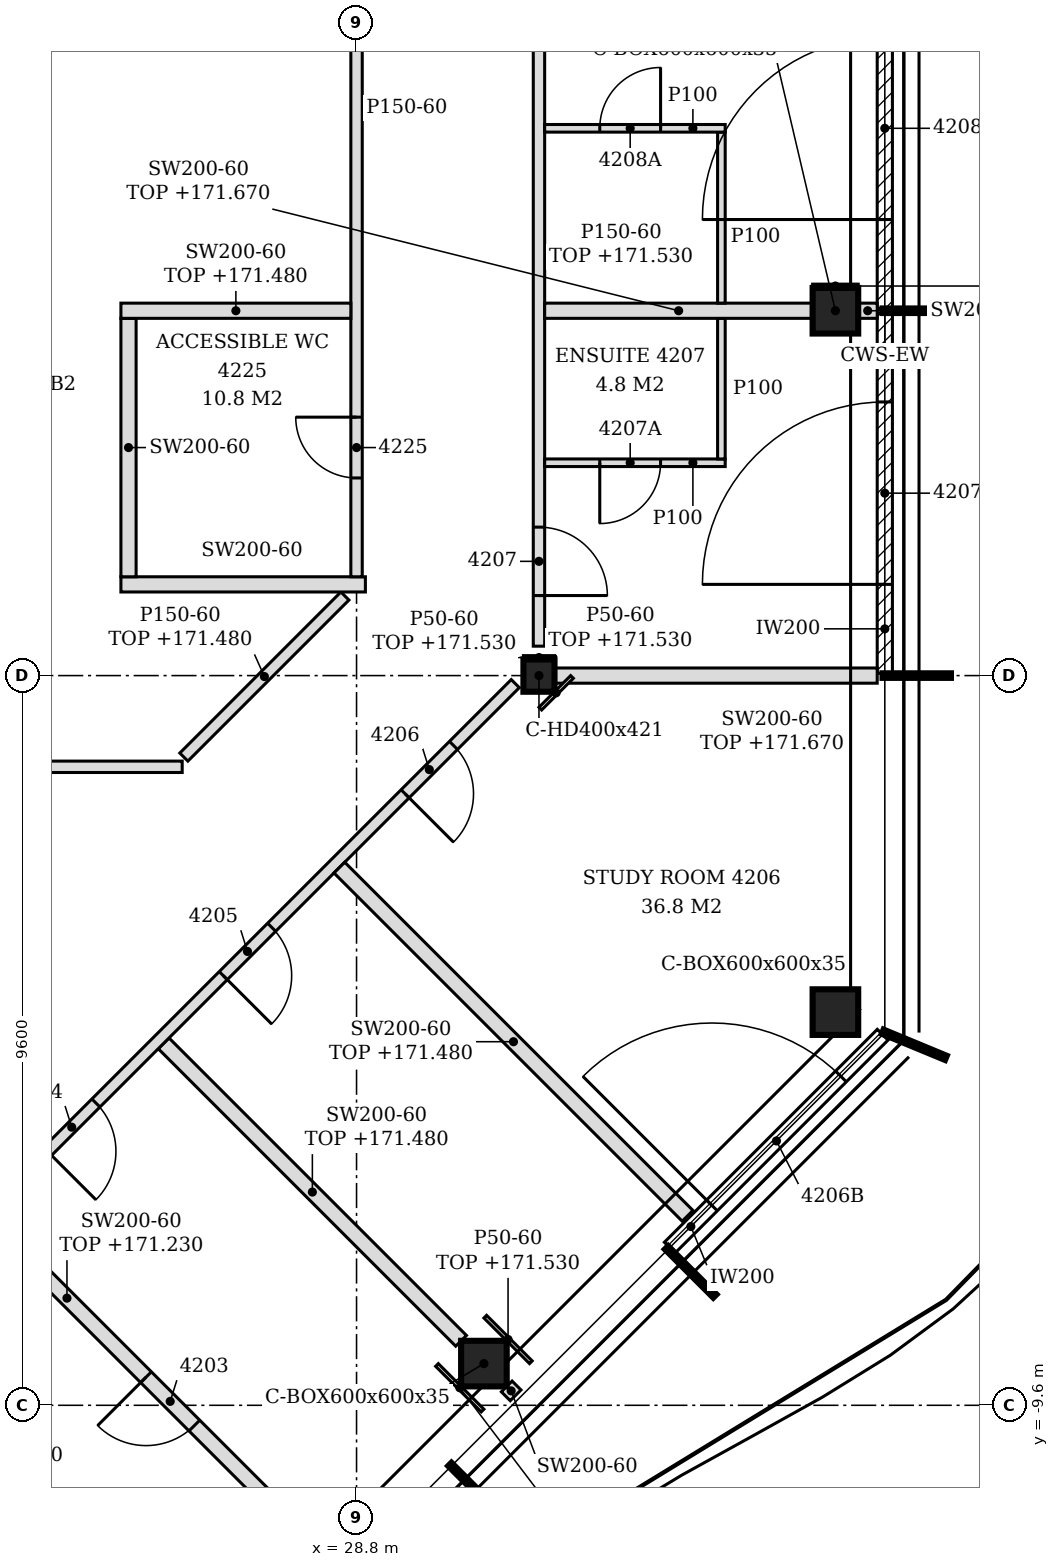
"""IFC4 building model, lengths in metres.
Left out: names, types, materials, properties, quantities, classifications, styles, units other than length and angle.
Written with IfcOpenShell. Run it as: python <this file> out.ifc"""

import sys

from ifc_helpers import new_model, si_unit, direction, frame, frame_2d, origin, origin_2d, place, context, subcontext, project, spatial, polyline, rectangle, hollow_rectangle, i_section, outline, extrude, clip, halfspace, element, fill, save


model = new_model("IFC4")
c1 = context("Model", 3, precision=1e-05, world=origin(), true_north=direction((0.0, 1.0)))
c2 = subcontext(c1, "Body", "Model", "MODEL_VIEW")
j1 = project(units=[si_unit("LENGTHUNIT", "METRE"), si_unit("PLANEANGLEUNIT", "RADIAN")], contexts=[c1])
p1 = place(None, origin())
s1 = spatial("IfcSite", under=j1, at=p1, CompositionType="ELEMENT")
p2 = place(p1, origin())
s2 = spatial("IfcBuilding", under=s1, at=p2, CompositionType="ELEMENT")
p3 = place(p2, frame((0.0, 0.0, 168.6)))
s3 = spatial("IfcBuildingStorey", under=s2, at=p3, CompositionType="ELEMENT", Elevation=168.6)
for number, where, z_axis, x_axis in (
    (1, (30.476, -9.052, -0.15), (0.0, 0.0, 1.0), (1.0, 0.0, 0.0)),
    (2, (35.1, -4.427, -0.15), (0.0, 0.0, 1.0), (1.0, 0.0, 0.0)),
    (3, (35.1, 4.8, -0.15), (0.0, 0.0, 1.0), (1.0, 0.0, 0.0)),
):
    element("IfcColumn", number, at=place(p3, frame(where, z_axis=z_axis, x_axis=x_axis)), inside=s3, PredefinedType="COLUMN", context=c2, shape_type="Clipping", body=[
        clip(extrude(hollow_rectangle(XDim=0.6, YDim=0.6, WallThickness=0.035, at=origin_2d()), origin(), (0.0, 0.0, 1.0), 3.6), halfspace(frame((0.0, 0.0, 3.589), z_axis=(0.0, 0.0, 1.0), x_axis=(1.0, 0.0, 0.0)), False)),
    ])
p4 = place(p3, frame((31.2, 0.0, -0.15), z_axis=(0.0, 0.0, 1.0), x_axis=(1.0, 0.0, 0.0)))
e4 = element("IfcColumn", 4, at=p4, inside=s3, PredefinedType="COLUMN", context=c2, shape_type="SweptSolid", body=[
    extrude(i_section(OverallWidth=0.409, OverallDepth=0.425, WebThickness=0.033, FlangeThickness=0.052, FilletRadius=0.015, at=origin_2d()), origin(), (0.0, 0.0, 1.0), 3.6),
])
p5 = place(p3, frame((32.92, -7.526, 0.0), z_axis=(0.0, 0.0, 1.0), x_axis=(0.707106781187, 0.707106781187, 0.0)))
e5 = element("IfcWall", 5, at=p5, inside=s3, PredefinedType="NOTDEFINED", context=c2, shape_type="SweptSolid", body=[
    extrude(rectangle(XDim=3.962, YDim=0.2, at=frame_2d((1.981, 0.0))), origin(), (0.0, 0.0, 1.0), 3.45),
])
p6 = place(p5, frame((0.785, 0.0, 0.0)))
e6 = element("IfcOpeningElement", 6, at=p6, cuts=e5, PredefinedType="OPENING", context=c2, shape_type="SweptSolid", body=[
    extrude(rectangle(XDim=2.4, YDim=2.4, at=frame_2d((1.2, 1.2))), frame((0.0, 0.11, 0.0), z_axis=(0.0, -1.0, 0.0), x_axis=(1.0, 0.0, 0.0)), (0.0, 0.0, 1.0), 0.22),
])
p7 = place(p3, frame((35.75, 0.03, 0.0), z_axis=(0.0, 0.0, 1.0), x_axis=(0.0, 1.0, 0.0)))
e7 = element("IfcWall", 7, at=p7, inside=s3, PredefinedType="NOTDEFINED", context=c2, shape_type="SweptSolid", body=[
    extrude(rectangle(XDim=4.74, YDim=0.2, at=frame_2d((2.37, 0.0))), origin(), (0.0, 0.0, 1.0), 3.45),
])
p8 = place(p7, frame((1.17, 0.0, 0.0)))
e8 = element("IfcOpeningElement", 8, at=p8, cuts=e7, PredefinedType="OPENING", context=c2, shape_type="SweptSolid", body=[
    extrude(rectangle(XDim=2.4, YDim=2.4, at=frame_2d((1.2, 1.2))), frame((0.0, 0.11, 0.0), z_axis=(0.0, -1.0, 0.0), x_axis=(1.0, 0.0, 0.0)), (0.0, 0.0, 1.0), 0.22),
])
p9 = place(p3, frame((35.75, 4.83, 0.0), z_axis=(0.0, 0.0, 1.0), x_axis=(0.0, 1.0, 0.0)))
e9 = element("IfcWall", 9, at=p9, inside=s3, PredefinedType="NOTDEFINED", context=c2, shape_type="SweptSolid", body=[
    extrude(rectangle(XDim=4.74, YDim=0.2, at=frame_2d((2.37, 0.0))), origin(), (0.0, 0.0, 1.0), 3.45),
])
p10 = place(p9, frame((1.17, 0.0, 0.0)))
e10 = element("IfcOpeningElement", 10, at=p10, cuts=e9, PredefinedType="OPENING", context=c2, shape_type="SweptSolid", body=[
    extrude(rectangle(XDim=2.4, YDim=2.4, at=frame_2d((1.2, 1.2))), frame((0.0, 0.11, 0.0), z_axis=(0.0, -1.0, 0.0), x_axis=(1.0, 0.0, 0.0)), (0.0, 0.0, 1.0), 0.22),
])
p11 = place(p3, frame((25.552, -13.375, 0.0), z_axis=(0.0, 0.0, 1.0), x_axis=(-0.707106781187, 0.707106781187, 0.0)))
e11 = element("IfcWall", 11, at=p11, inside=s3, PredefinedType="PARTITIONING", context=c2, shape_type="SweptSolid", body=[
    extrude(rectangle(XDim=6.83, YDim=0.2, at=frame_2d((3.415, 0.0))), origin(), (0.0, 0.0, 1.0), 2.93),
])
p12 = place(p3, frame((28.581, -11.781, 0.0), z_axis=(0.0, 0.0, 1.0), x_axis=(-0.707106781187, 0.707106781187, 0.0)))
e12 = element("IfcWall", 12, at=p12, inside=s3, PredefinedType="PARTITIONING", context=c2, shape_type="SweptSolid", body=[
    extrude(rectangle(XDim=6.549, YDim=0.2, at=frame_2d((3.274, 0.0))), origin(), (0.0, 0.0, 1.0), 2.63),
])
p13 = place(p12, frame((2.707, 0.0, 0.0)))
e13 = element("IfcOpeningElement", 13, at=p13, cuts=e12, PredefinedType="OPENING", context=c2, shape_type="SweptSolid", body=[
    extrude(rectangle(XDim=0.9, YDim=2.1, at=frame_2d((0.45, 1.05))), frame((0.0, 0.11, 0.0), z_axis=(0.0, -1.0, 0.0), x_axis=(1.0, 0.0, 0.0)), (0.0, 0.0, 1.0), 0.22),
])
p14 = place(p3, frame((30.893, -9.469, 0.0), z_axis=(0.0, 0.0, 1.0), x_axis=(-0.707106781187, 0.707106781187, 0.0)))
e14 = element("IfcWall", 14, at=p14, inside=s3, PredefinedType="PARTITIONING", context=c2, shape_type="SweptSolid", body=[
    extrude(rectangle(XDim=0.166, YDim=0.2, at=frame_2d((0.083, 0.0))), origin(), (0.0, 0.0, 1.0), 3.45),
])
p15 = place(p3, frame((30.176, -8.752, 0.0), z_axis=(0.0, 0.0, 1.0), x_axis=(-0.707084725798, 0.707128835887, 0.0)))
e15 = element("IfcWall", 15, at=p15, inside=s3, PredefinedType="PARTITIONING", context=c2, shape_type="SweptSolid", body=[
    extrude(rectangle(XDim=5.535, YDim=0.2, at=frame_2d((2.768, 0.0))), origin(), (0.0, 0.0, 1.0), 2.88),
])
p16 = place(p3, frame((22.722, -8.272, 0.0), z_axis=(0.0, 0.0, 1.0), x_axis=(0.707106781187, 0.707106781187, 0.0)))
e16 = element("IfcWall", 16, at=p16, inside=s3, PredefinedType="PARTITIONING", context=c2, shape_type="SweptSolid", body=[
    extrude(rectangle(XDim=11.549, YDim=0.15, at=frame_2d((5.774, 0.0))), origin(), (0.0, 0.0, 1.0), 2.88),
])
p17 = place(p16, frame((2.846, 0.0, 0.0)))
e17 = element("IfcOpeningElement", 17, at=p17, cuts=e16, PredefinedType="OPENING", context=c2, shape_type="SweptSolid", body=[
    extrude(rectangle(XDim=0.9, YDim=2.1, at=frame_2d((0.45, 1.05))), frame((0.0, 0.085, 0.0), z_axis=(0.0, -1.0, 0.0), x_axis=(1.0, 0.0, 0.0)), (0.0, 0.0, 1.0), 0.17),
])
p18 = place(p16, frame((6.116, 0.0, 0.0)))
e18 = element("IfcOpeningElement", 18, at=p18, cuts=e16, PredefinedType="OPENING", context=c2, shape_type="SweptSolid", body=[
    extrude(rectangle(XDim=0.9, YDim=2.1, at=frame_2d((0.45, 1.05))), frame((0.0, 0.085, 0.0), z_axis=(0.0, -1.0, 0.0), x_axis=(1.0, 0.0, 0.0)), (0.0, 0.0, 1.0), 0.17),
])
p19 = place(p16, frame((9.499, 0.0, 0.0)))
e19 = element("IfcOpeningElement", 19, at=p19, cuts=e16, PredefinedType="OPENING", context=c2, shape_type="SweptSolid", body=[
    extrude(rectangle(XDim=0.9, YDim=2.1, at=frame_2d((0.45, 1.05))), frame((0.0, 0.085, 0.0), z_axis=(0.0, -1.0, 0.0), x_axis=(1.0, 0.0, 0.0)), (0.0, 0.0, 1.0), 0.17),
])
p20 = place(p3, frame((33.155, -7.107, 0.0), z_axis=(0.0, 0.0, 1.0), x_axis=(-0.70708794033, 0.707125621541, 0.0)))
e20 = element("IfcWall", 20, at=p20, inside=s3, PredefinedType="PARTITIONING", context=c2, shape_type="SweptSolid", body=[
    extrude(rectangle(XDim=6.479, YDim=0.2, at=frame_2d((3.24, 0.0))), origin(), (0.0, 0.0, 1.0), 2.88),
])
p21 = place(p3, frame((19.125, -1.2, 0.0), z_axis=(0.0, 0.0, 1.0), x_axis=(1.0, 0.0, 0.0)))
e21 = element("IfcWall", 21, at=p21, inside=s3, PredefinedType="PARTITIONING", context=c2, shape_type="SweptSolid", body=[
    extrude(outline(polyline([(0.0, 0.0), (7.381, 0.0), (7.381, 3.45), (0.225, 3.45), (0.223, 2.83), (0.0, 2.83), (0.0, 0.0)])), frame((0.0, 0.075, 0.0), z_axis=(0.0, -1.0, 0.0), x_axis=(1.0, 0.0, 0.0)), (0.0, 0.0, 1.0), 0.15),
])
p22 = place(p3, frame((26.528, -1.072, 0.0), z_axis=(0.0, 0.0, 1.0), x_axis=(0.707106781187, 0.707106781187, 0.0)))
e22 = element("IfcWall", 22, at=p22, inside=s3, PredefinedType="PARTITIONING", context=c2, shape_type="SweptSolid", body=[
    extrude(rectangle(XDim=2.997, YDim=0.15, at=frame_2d((1.498, 0.0))), origin(), (0.0, 0.0, 1.0), 2.88),
])
p23 = place(p3, frame((31.405, 0.0, 0.0), z_axis=(0.0, 0.0, 1.0), x_axis=(1.0, 0.0, 0.0)))
e23 = element("IfcWall", 23, at=p23, inside=s3, PredefinedType="PARTITIONING", context=c2, shape_type="SweptSolid", body=[
    extrude(outline(polyline([(0.0, 0.0), (4.245, 0.0), (4.246, 3.07), (3.845, 3.07), (3.844, 2.93), (3.545, 2.93), (3.543, 3.07), (0.0, 3.07), (0.0, 0.0)])), frame((0.0, 0.1, 0.0), z_axis=(0.0, -1.0, 0.0), x_axis=(1.0, 0.0, 0.0)), (0.0, 0.0, 1.0), 0.2),
])
p24 = place(p3, frame((31.2, 0.387, 0.0), z_axis=(0.0, 0.0, 1.0), x_axis=(0.0, 1.0, 0.0)))
e24 = element("IfcWall", 24, at=p24, inside=s3, PredefinedType="PARTITIONING", context=c2, shape_type="SweptSolid", body=[
    extrude(rectangle(XDim=9.0, YDim=0.15, at=frame_2d((4.5, 0.0))), origin(), (0.0, 0.0, 1.0), 2.93),
])
p25 = place(p24, frame((0.666, 0.0, 0.0)))
e25 = element("IfcOpeningElement", 25, at=p25, cuts=e24, PredefinedType="OPENING", context=c2, shape_type="SweptSolid", body=[
    extrude(rectangle(XDim=0.9, YDim=2.1, at=frame_2d((0.45, 1.05))), frame((0.0, 0.085, 0.0), z_axis=(0.0, -1.0, 0.0), x_axis=(1.0, 0.0, 0.0)), (0.0, 0.0, 1.0), 0.17),
])
p26 = place(p3, frame((25.7, 1.2, 0.0), z_axis=(0.0, 0.0, 1.0), x_axis=(1.0, 0.0, 0.0)))
e26 = element("IfcWall", 26, at=p26, inside=s3, PredefinedType="PARTITIONING", context=c2, shape_type="SweptSolid", body=[
    extrude(rectangle(XDim=3.217, YDim=0.2, at=frame_2d((1.608, 0.0))), origin(), (0.0, 0.0, 1.0), 3.45),
])
p27 = place(p3, frame((25.8, 1.3, 0.0), z_axis=(0.0, 0.0, 1.0), x_axis=(0.0, 1.0, 0.0)))
e27 = element("IfcWall", 27, at=p27, inside=s3, PredefinedType="PARTITIONING", context=c2, shape_type="SweptSolid", body=[
    extrude(outline(polyline([(0.0, 0.0), (3.4, 0.0), (3.4, 2.88), (3.395, 2.88), (3.393, 3.45), (0.0, 3.45), (0.0, 0.0)])), frame((0.0, 0.1, 0.0), z_axis=(0.0, -1.0, 0.0), x_axis=(1.0, 0.0, 0.0)), (0.0, 0.0, 1.0), 0.2),
])
p28 = place(p3, frame((28.8, 1.3, 0.0), z_axis=(0.0, 0.0, 1.0), x_axis=(0.0, 1.0, 0.0)))
e28 = element("IfcWall", 28, at=p28, inside=s3, PredefinedType="PARTITIONING", context=c2, shape_type="SweptSolid", body=[
    extrude(outline(polyline([(0.0, 0.0), (10.224, 0.0), (10.224, 3.45), (8.405, 3.45), (8.403, 2.88), (8.195, 2.88), (8.193, 3.45), (3.605, 3.45), (3.603, 2.88), (3.395, 2.88), (3.393, 3.45), (0.0, 3.45), (0.0, 0.0)])), frame((0.0, 0.075, 0.0), z_axis=(0.0, -1.0, 0.0), x_axis=(1.0, 0.0, 0.0)), (0.0, 0.0, 1.0), 0.15),
])
p29 = place(p28, frame((1.3, 0.0, 0.0)))
e29 = element("IfcOpeningElement", 29, at=p29, cuts=e28, PredefinedType="OPENING", context=c2, shape_type="SweptSolid", body=[
    extrude(rectangle(XDim=0.8, YDim=2.1, at=frame_2d((0.4, 1.05))), frame((0.0, 0.085, 0.0), z_axis=(0.0, -1.0, 0.0), x_axis=(1.0, 0.0, 0.0)), (0.0, 0.0, 1.0), 0.17),
])
p30 = place(p3, frame((31.275, 2.8, 0.0), z_axis=(0.0, 0.0, 1.0), x_axis=(1.0, 0.0, 0.0)))
e30 = element("IfcWall", 30, at=p30, inside=s3, PredefinedType="PARTITIONING", context=c2, shape_type="SweptSolid", body=[
    extrude(outline(polyline([(0.0, 0.0), (2.375, 0.0), (2.375, 3.45), (0.075, 3.45), (0.073, 2.93), (0.0, 2.93), (0.0, 0.0)])), frame((0.0, 0.05, 0.0), z_axis=(0.0, -1.0, 0.0), x_axis=(1.0, 0.0, 0.0)), (0.0, 0.0, 1.0), 0.1),
])
p31 = place(p30, frame((0.725, 0.0, 0.0)))
e31 = element("IfcOpeningElement", 31, at=p31, cuts=e30, PredefinedType="OPENING", context=c2, shape_type="SweptSolid", body=[
    extrude(rectangle(XDim=0.8, YDim=2.1, at=frame_2d((0.4, 1.05))), frame((0.0, 0.06, 0.0), z_axis=(0.0, -1.0, 0.0), x_axis=(1.0, 0.0, 0.0)), (0.0, 0.0, 1.0), 0.12),
])
p32 = place(p3, frame((33.6, 2.85, 0.0), z_axis=(0.0, 0.0, 1.0), x_axis=(0.0, 1.0, 0.0)))
e32 = element("IfcWall", 32, at=p32, inside=s3, PredefinedType="PARTITIONING", context=c2, shape_type="SweptSolid", body=[
    extrude(rectangle(XDim=1.85, YDim=0.1, at=frame_2d((0.925, 0.0))), origin(), (0.0, 0.0, 1.0), 3.45),
])
p33 = place(p3, frame((25.7, 4.8, 0.0), z_axis=(0.0, 0.0, 1.0), x_axis=(1.0, 0.0, 0.0)))
e33 = element("IfcWall", 33, at=p33, inside=s3, PredefinedType="PARTITIONING", context=c2, shape_type="SweptSolid", body=[
    extrude(rectangle(XDim=3.025, YDim=0.2, at=frame_2d((1.513, 0.0))), origin(), (0.0, 0.0, 1.0), 2.88),
])
p34 = place(p3, frame((31.275, 4.8, 0.0), z_axis=(0.0, 0.0, 1.0), x_axis=(1.0, 0.0, 0.0)))
e34 = element("IfcWall", 34, at=p34, inside=s3, PredefinedType="PARTITIONING", context=c2, shape_type="SweptSolid", body=[
    extrude(outline(polyline([(0.0, 0.0), (3.525, 0.0), (3.525, 3.07), (0.075, 3.07), (0.073, 2.93), (0.0, 2.93), (0.0, 0.0)])), frame((0.0, 0.1, 0.0), z_axis=(0.0, -1.0, 0.0), x_axis=(1.0, 0.0, 0.0)), (0.0, 0.0, 1.0), 0.2),
])
p35 = place(p3, frame((35.4, 4.8, 0.0), z_axis=(0.0, 0.0, 1.0), x_axis=(1.0, 0.0, 0.0)))
e35 = element("IfcWall", 35, at=p35, inside=s3, PredefinedType="PARTITIONING", context=c2, shape_type="SweptSolid", body=[
    extrude(rectangle(XDim=0.25, YDim=0.2, at=frame_2d((0.125, 0.0))), origin(), (0.0, 0.0, 1.0), 3.45),
])
p36 = place(p3, frame((33.6, 4.9, 0.0), z_axis=(0.0, 0.0, 1.0), x_axis=(0.0, 1.0, 0.0)))
e36 = element("IfcWall", 36, at=p36, inside=s3, PredefinedType="PARTITIONING", context=c2, shape_type="SweptSolid", body=[
    extrude(rectangle(XDim=2.25, YDim=0.1, at=frame_2d((1.125, 0.0))), origin(), (0.0, 0.0, 1.0), 3.45),
])
p37 = place(p3, frame((31.275, 7.2, 0.0), z_axis=(0.0, 0.0, 1.0), x_axis=(1.0, 0.0, 0.0)))
e37 = element("IfcWall", 37, at=p37, inside=s3, PredefinedType="PARTITIONING", context=c2, shape_type="SweptSolid", body=[
    extrude(outline(polyline([(0.0, 0.0), (2.375, 0.0), (2.375, 3.45), (0.075, 3.45), (0.073, 2.93), (0.0, 2.93), (0.0, 0.0)])), frame((0.0, 0.05, 0.0), z_axis=(0.0, -1.0, 0.0), x_axis=(1.0, 0.0, 0.0)), (0.0, 0.0, 1.0), 0.1),
])
p38 = place(p37, frame((0.725, 0.0, 0.0)))
e38 = element("IfcOpeningElement", 38, at=p38, cuts=e37, PredefinedType="OPENING", context=c2, shape_type="SweptSolid", body=[
    extrude(rectangle(XDim=0.8, YDim=2.1, at=frame_2d((0.4, 1.05))), frame((0.0, 0.06, 0.0), z_axis=(0.0, -1.0, 0.0), x_axis=(1.0, 0.0, 0.0)), (0.0, 0.0, 1.0), 0.12),
])
p39 = place(p3, frame((30.458, -9.669, 0.0), z_axis=(0.0, 0.0, 1.0), x_axis=(-0.707106781187, 0.707106781187, 0.0)))
e39 = element("IfcWall", 39, at=p39, inside=s3, PredefinedType="PARTITIONING", context=c2, shape_type="SweptSolid", body=[
    extrude(rectangle(XDim=0.849, YDim=0.05, at=frame_2d((0.424, 0.0))), origin(), (0.0, 0.0, 1.0), 2.63),
])
p40 = place(p3, frame((31.094, -9.034, 0.0), z_axis=(0.0, 0.0, 1.0), x_axis=(-0.707250633645, 0.706962899457, 0.0)))
e40 = element("IfcWall", 40, at=p40, inside=s3, PredefinedType="PARTITIONING", context=c2, shape_type="SweptSolid", body=[
    extrude(rectangle(XDim=0.848, YDim=0.05, at=frame_2d((0.424, 0.0))), origin(), (0.0, 0.0, 1.0), 2.93),
])
p41 = place(p3, frame((31.218, -0.435, 0.0), z_axis=(0.0, 0.0, 1.0), x_axis=(0.706899813022, 0.70731368879, 0.0)))
e41 = element("IfcWall", 41, at=p41, inside=s3, PredefinedType="PARTITIONING", context=c2, shape_type="SweptSolid", body=[
    extrude(rectangle(XDim=0.59, YDim=0.05, at=frame_2d((0.295, 0.0))), origin(), (0.0, 0.0, 1.0), 2.93),
])
p42 = place(p3, frame((30.996, 0.238, 0.0), z_axis=(0.0, 0.0, 1.0), x_axis=(1.0, 0.0, 0.0)))
e42 = element("IfcWall", 42, at=p42, inside=s3, PredefinedType="PARTITIONING", context=c2, shape_type="SweptSolid", body=[
    extrude(rectangle(XDim=0.409, YDim=0.05, at=frame_2d((0.205, 0.0))), origin(), (0.0, 0.0, 1.0), 2.93),
])
p43 = place(p3, frame((34.8, 5.125, 0.0), z_axis=(0.0, 0.0, 1.0), x_axis=(1.0, 0.0, 0.0)))
e43 = element("IfcWall", 43, at=p43, inside=s3, PredefinedType="PARTITIONING", context=c2, shape_type="SweptSolid", body=[
    extrude(rectangle(XDim=0.6, YDim=0.05, at=frame_2d((0.3, 0.0))), origin(), (0.0, 0.0, 1.0), 2.93),
])
p44 = place(p6, origin())
e44 = element("IfcDoor", 44, at=p44, inside=s3, OperationType="SINGLE_SWING_LEFT", PredefinedType="DOOR", context=c2, shape_type="SweptSolid", body=[
    extrude(rectangle(XDim=2.4, YDim=2.4, at=frame_2d((1.2, 1.2))), frame((0.0, 0.025, 0.0), z_axis=(0.0, -1.0, 0.0), x_axis=(1.0, 0.0, 0.0)), (0.0, 0.0, 1.0), 0.05),
])
fill(e6, e44)
p45 = place(p8, origin())
e45 = element("IfcDoor", 45, at=p45, inside=s3, OperationType="SINGLE_SWING_LEFT", PredefinedType="DOOR", context=c2, shape_type="SweptSolid", body=[
    extrude(rectangle(XDim=2.4, YDim=2.4, at=frame_2d((1.2, 1.2))), frame((0.0, 0.025, 0.0), z_axis=(0.0, -1.0, 0.0), x_axis=(1.0, 0.0, 0.0)), (0.0, 0.0, 1.0), 0.05),
])
fill(e8, e45)
p46 = place(p10, origin())
e46 = element("IfcDoor", 46, at=p46, inside=s3, OperationType="SINGLE_SWING_LEFT", PredefinedType="DOOR", context=c2, shape_type="SweptSolid", body=[
    extrude(rectangle(XDim=2.4, YDim=2.4, at=frame_2d((1.2, 1.2))), frame((0.0, 0.025, 0.0), z_axis=(0.0, -1.0, 0.0), x_axis=(1.0, 0.0, 0.0)), (0.0, 0.0, 1.0), 0.05),
])
fill(e10, e46)
p47 = place(p13, origin())
e47 = element("IfcDoor", 47, at=p47, inside=s3, OperationType="SINGLE_SWING_RIGHT", PredefinedType="DOOR", context=c2, shape_type="SweptSolid", body=[
    extrude(rectangle(XDim=0.9, YDim=2.1, at=frame_2d((0.45, 1.05))), frame((0.0, 0.025, 0.0), z_axis=(0.0, -1.0, 0.0), x_axis=(1.0, 0.0, 0.0)), (0.0, 0.0, 1.0), 0.05),
])
fill(e13, e47)
p48 = place(p17, frame((0.9, 0.0, 0.0), z_axis=(0.0, 0.0, 1.0), x_axis=(-1.0, 0.0, 0.0)))
e48 = element("IfcDoor", 48, at=p48, inside=s3, OperationType="SINGLE_SWING_RIGHT", PredefinedType="DOOR", context=c2, shape_type="SweptSolid", body=[
    extrude(rectangle(XDim=0.9, YDim=2.1, at=frame_2d((0.45, 1.05))), frame((0.0, 0.025, 0.0), z_axis=(0.0, -1.0, 0.0), x_axis=(1.0, 0.0, 0.0)), (0.0, 0.0, 1.0), 0.05),
])
fill(e17, e48)
p49 = place(p18, frame((0.9, 0.0, 0.0), z_axis=(0.0, 0.0, 1.0), x_axis=(-1.0, 0.0, 0.0)))
e49 = element("IfcDoor", 49, at=p49, inside=s3, OperationType="SINGLE_SWING_RIGHT", PredefinedType="DOOR", context=c2, shape_type="SweptSolid", body=[
    extrude(rectangle(XDim=0.9, YDim=2.1, at=frame_2d((0.45, 1.05))), frame((0.0, 0.025, 0.0), z_axis=(0.0, -1.0, 0.0), x_axis=(1.0, 0.0, 0.0)), (0.0, 0.0, 1.0), 0.05),
])
fill(e18, e49)
p50 = place(p19, frame((0.9, 0.0, 0.0), z_axis=(0.0, 0.0, 1.0), x_axis=(-1.0, 0.0, 0.0)))
e50 = element("IfcDoor", 50, at=p50, inside=s3, OperationType="SINGLE_SWING_RIGHT", PredefinedType="DOOR", context=c2, shape_type="SweptSolid", body=[
    extrude(rectangle(XDim=0.9, YDim=2.1, at=frame_2d((0.45, 1.05))), frame((0.0, 0.025, 0.0), z_axis=(0.0, -1.0, 0.0), x_axis=(1.0, 0.0, 0.0)), (0.0, 0.0, 1.0), 0.05),
])
fill(e19, e50)
p51 = place(p25, frame((0.9, 0.0, 0.0), z_axis=(0.0, 0.0, 1.0), x_axis=(-1.0, 0.0, 0.0)))
e51 = element("IfcDoor", 51, at=p51, inside=s3, OperationType="SINGLE_SWING_RIGHT", PredefinedType="DOOR", context=c2, shape_type="SweptSolid", body=[
    extrude(rectangle(XDim=0.9, YDim=2.1, at=frame_2d((0.45, 1.05))), frame((0.0, 0.025, 0.0), z_axis=(0.0, -1.0, 0.0), x_axis=(1.0, 0.0, 0.0)), (0.0, 0.0, 1.0), 0.05),
])
fill(e25, e51)
p52 = place(p31, frame((0.8, 0.0, 0.0), z_axis=(0.0, 0.0, 1.0), x_axis=(-1.0, 0.0, 0.0)))
e52 = element("IfcDoor", 52, at=p52, inside=s3, OperationType="SINGLE_SWING_RIGHT", PredefinedType="DOOR", context=c2, shape_type="SweptSolid", body=[
    extrude(rectangle(XDim=0.8, YDim=2.1, at=frame_2d((0.4, 1.05))), frame((0.0, 0.025, 0.0), z_axis=(0.0, -1.0, 0.0), x_axis=(1.0, 0.0, 0.0)), (0.0, 0.0, 1.0), 0.05),
])
fill(e31, e52)
p53 = place(p38, origin())
e53 = element("IfcDoor", 53, at=p53, inside=s3, OperationType="SINGLE_SWING_RIGHT", PredefinedType="DOOR", context=c2, shape_type="SweptSolid", body=[
    extrude(rectangle(XDim=0.8, YDim=2.1, at=frame_2d((0.4, 1.05))), frame((0.0, 0.025, 0.0), z_axis=(0.0, -1.0, 0.0), x_axis=(1.0, 0.0, 0.0)), (0.0, 0.0, 1.0), 0.05),
])
fill(e38, e53)
p54 = place(p29, origin())
e54 = element("IfcDoor", 54, at=p54, inside=s3, OperationType="SINGLE_SWING_RIGHT", PredefinedType="DOOR", context=c2, shape_type="SweptSolid", body=[
    extrude(rectangle(XDim=0.8, YDim=2.1, at=frame_2d((0.4, 1.05))), frame((0.0, 0.025, 0.0), z_axis=(0.0, -1.0, 0.0), x_axis=(1.0, 0.0, 0.0)), (0.0, 0.0, 1.0), 0.05),
])
fill(e29, e54)
save(model, sys.argv[1])
